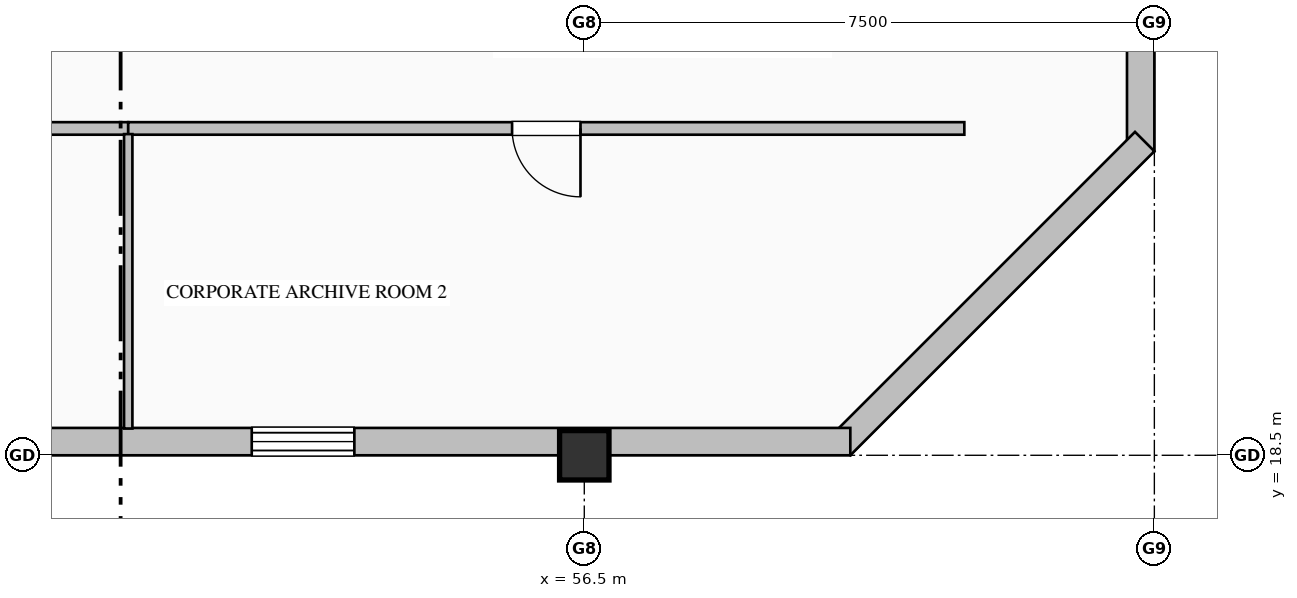
"""IFC4 building model, lengths in metres.
Left out: names, types, materials, properties, quantities, classifications, styles, units other than length and angle.
Written with IfcOpenShell. Run it as: python <this file> out.ifc"""

import sys

from ifc_helpers import new_model, si_unit, direction, frame, frame_2d, origin, origin_2d, place, context, subcontext, project, spatial, rectangle, hollow_rectangle, extrude, element, fill, save


model = new_model("IFC4")
c1 = context("Model", 3, precision=1e-05, world=origin(), true_north=direction((0.0, 1.0)))
c2 = subcontext(c1, "Body", "Model", "MODEL_VIEW")
j1 = project(units=[si_unit("LENGTHUNIT", "METRE"), si_unit("PLANEANGLEUNIT", "RADIAN")], contexts=[c1])
p1 = place(None, origin())
s1 = spatial("IfcSite", under=j1, at=p1, CompositionType="ELEMENT")
p2 = place(p1, origin())
s2 = spatial("IfcBuilding", under=s1, at=p2, CompositionType="ELEMENT")
p3 = place(p2, frame((0.0, 0.0, 319.2)))
s3 = spatial("IfcBuildingStorey", under=s2, at=p3, CompositionType="ELEMENT", Elevation=319.2)
p4 = place(p3, frame((56.5, 18.5, 0.0), z_axis=(0.0, 0.0, 1.0), x_axis=(1.0, 0.0, 0.0)))
e1 = element("IfcColumn", 1, at=p4, inside=s3, PredefinedType="COLUMN", context=c2, shape_type="SweptSolid", body=[
    extrude(hollow_rectangle(XDim=0.65, YDim=0.65, WallThickness=0.028, at=origin_2d()), origin(), (0.0, 0.0, 1.0), 4.0),
])
p5 = place(p3, frame((63.82, 36.05, 0.0), z_axis=(0.0, 0.0, 1.0), x_axis=(0.0, -1.0, 0.0)))
e2 = element("IfcWall", 2, at=p5, inside=s3, PredefinedType="SOLIDWALL", context=c2, shape_type="SweptSolid", body=[
    extrude(rectangle(XDim=13.55, YDim=0.36, at=frame_2d((6.775, 0.0))), origin(), (0.0, 0.0, 1.0), 3.335),
])
p6 = place(p5, frame((2.925, 0.0, 0.9)))
e3 = element("IfcOpeningElement", 3, at=p6, cuts=e2, PredefinedType="OPENING", context=c2, shape_type="SweptSolid", body=[
    extrude(rectangle(XDim=1.35, YDim=1.85, at=frame_2d((0.675, 0.925))), frame((0.0, 0.19, 0.0), z_axis=(0.0, -1.0, 0.0), x_axis=(1.0, 0.0, 0.0)), (0.0, 0.0, 1.0), 0.38),
])
p7 = place(p3, frame((63.873, 22.627, 0.0), z_axis=(0.0, 0.0, 1.0), x_axis=(-0.707106781187, -0.707106781187, 0.0)))
e4 = element("IfcWall", 4, at=p7, inside=s3, PredefinedType="SOLIDWALL", context=c2, shape_type="SweptSolid", body=[
    extrude(rectangle(XDim=5.657, YDim=0.36, at=frame_2d((2.828, 0.0))), origin(), (0.0, 0.0, 1.0), 3.785),
])
p8 = place(p3, frame((60.0, 18.68, 0.0), z_axis=(0.0, 0.0, 1.0), x_axis=(-1.0, 0.0, 0.0)))
e5 = element("IfcWall", 5, at=p8, inside=s3, PredefinedType="SOLIDWALL", context=c2, shape_type="SweptSolid", body=[
    extrude(rectangle(XDim=15.5, YDim=0.36, at=frame_2d((7.75, 0.0))), origin(), (0.0, 0.0, 1.0), 3.335),
])
p9 = place(p8, frame((6.525, 0.0, 0.9)))
e6 = element("IfcOpeningElement", 6, at=p9, cuts=e5, PredefinedType="OPENING", context=c2, shape_type="SweptSolid", body=[
    extrude(rectangle(XDim=1.35, YDim=1.85, at=frame_2d((0.675, 0.925))), frame((0.0, 0.19, 0.0), z_axis=(0.0, -1.0, 0.0), x_axis=(1.0, 0.0, 0.0)), (0.0, 0.0, 1.0), 0.38),
])
p10 = place(p3, frame((50.5, 22.8, 0.0), z_axis=(0.0, 0.0, 1.0), x_axis=(-1.0, 0.0, 0.0)))
e7 = element("IfcWall", 7, at=p10, inside=s3, PredefinedType="PARTITIONING", context=c2, shape_type="SweptSolid", body=[
    extrude(rectangle(XDim=5.3, YDim=0.165, at=frame_2d((2.65, 0.0))), origin(), (0.0, 0.0, 1.0), 3.785),
])
p11 = place(p10, frame((2.15, 0.0, 0.0)))
e8 = element("IfcOpeningElement", 8, at=p11, cuts=e7, PredefinedType="OPENING", context=c2, shape_type="SweptSolid", body=[
    extrude(rectangle(XDim=1.0, YDim=2.15, at=frame_2d((0.5, 1.075))), frame((0.0, 0.093, 0.0), z_axis=(0.0, -1.0, 0.0), x_axis=(1.0, 0.0, 0.0)), (0.0, 0.0, 1.0), 0.185),
])
p12 = place(p3, frame((61.5, 22.8, 0.0), z_axis=(0.0, 0.0, 1.0), x_axis=(-1.0, 0.0, 0.0)))
e9 = element("IfcWall", 9, at=p12, inside=s3, PredefinedType="PARTITIONING", context=c2, shape_type="SweptSolid", body=[
    extrude(rectangle(XDim=11.0, YDim=0.165, at=frame_2d((5.5, 0.0))), origin(), (0.0, 0.0, 1.0), 3.785),
])
p13 = place(p12, frame((5.05, 0.0, 0.0)))
e10 = element("IfcOpeningElement", 10, at=p13, cuts=e9, PredefinedType="OPENING", context=c2, shape_type="SweptSolid", body=[
    extrude(rectangle(XDim=0.9, YDim=2.15, at=frame_2d((0.45, 1.075))), frame((0.0, 0.093, 0.0), z_axis=(0.0, -1.0, 0.0), x_axis=(1.0, 0.0, 0.0)), (0.0, 0.0, 1.0), 0.185),
])
p14 = place(p3, frame((50.5, 22.726, 0.0), z_axis=(0.0, 0.0, 1.0), x_axis=(0.0, -1.0, 0.0)))
e11 = element("IfcWall", 11, at=p14, inside=s3, PredefinedType="MOVABLE", context=c2, shape_type="SweptSolid", body=[
    extrude(rectangle(XDim=3.874, YDim=0.11, at=frame_2d((1.937, 0.0))), origin(), (0.0, 0.0, 1.0), 3.785),
])
p15 = place(p9, origin())
e12 = element("IfcWindow", 12, at=p15, inside=s3, PartitioningType="DOUBLE_PANEL_VERTICAL", PredefinedType="WINDOW", context=c2, shape_type="SweptSolid", body=[
    extrude(rectangle(XDim=1.35, YDim=1.85, at=frame_2d((0.675, 0.925))), frame((0.0, 0.15, 0.0), z_axis=(0.0, -1.0, 0.0), x_axis=(1.0, 0.0, 0.0)), (0.0, 0.0, 1.0), 0.06),
])
fill(e6, e12)
p16 = place(p13, origin())
e13 = element("IfcDoor", 13, at=p16, inside=s3, OperationType="SINGLE_SWING_LEFT", PredefinedType="DOOR", context=c2, shape_type="SweptSolid", body=[
    extrude(rectangle(XDim=0.9, YDim=2.15, at=frame_2d((0.45, 1.075))), frame((0.0, 0.025, 0.0), z_axis=(0.0, -1.0, 0.0), x_axis=(1.0, 0.0, 0.0)), (0.0, 0.0, 1.0), 0.05),
])
fill(e10, e13)
save(model, sys.argv[1])
